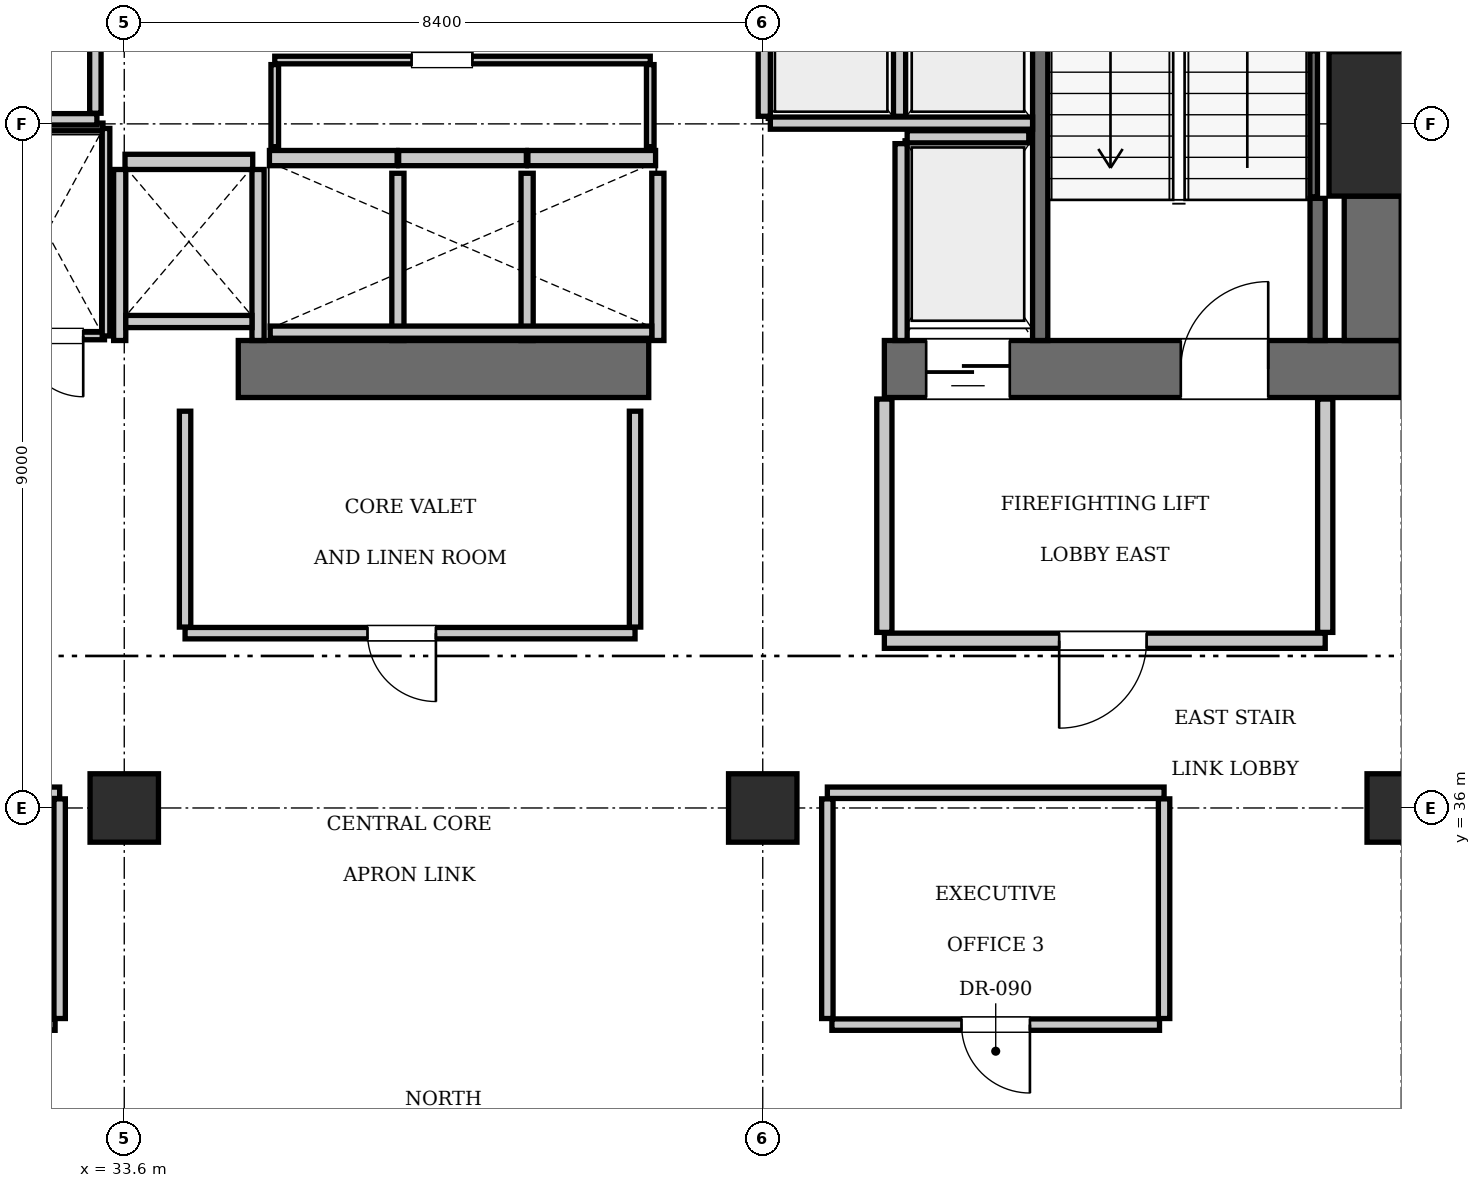
"""IFC4 building model, lengths in metres.
Left out: names, types, materials, properties, quantities, classifications, styles, units other than length and angle.
Written with IfcOpenShell. Run it as: python <this file> out.ifc"""

import sys

from ifc_helpers import new_model, si_unit, direction, frame, frame_2d, origin, origin_2d, place, context, subcontext, project, spatial, rectangle, extrude, element, fill, save


model = new_model("IFC4")
c1 = context("Model", 3, precision=1e-05, world=origin(), true_north=direction((0.0, 1.0)))
c2 = subcontext(c1, "Body", "Model", "MODEL_VIEW")
j1 = project(units=[si_unit("LENGTHUNIT", "METRE"), si_unit("PLANEANGLEUNIT", "RADIAN")], contexts=[c1])
p1 = place(None, origin())
s1 = spatial("IfcSite", under=j1, at=p1, CompositionType="ELEMENT")
p2 = place(p1, origin())
s2 = spatial("IfcBuilding", under=s1, at=p2, CompositionType="ELEMENT")
p3 = place(p2, frame((0.0, 0.0, 196.7)))
s3 = spatial("IfcBuildingStorey", under=s2, at=p3, CompositionType="ELEMENT", Elevation=196.7)
p4 = place(p3, frame((50.4, 45.0, 0.0), z_axis=(0.0, 0.0, 1.0), x_axis=(1.0, 0.0, 0.0)))
e1 = element("IfcColumn", 1, at=p4, inside=s3, PredefinedType="COLUMN", context=c2, shape_type="SweptSolid", body=[
    extrude(rectangle(XDim=1.9, YDim=1.9, at=origin_2d()), origin(), (0.0, 0.0, 1.0), 3.85),
])
p5 = place(p3, frame((35.1, 41.775, 0.0), z_axis=(0.0, 0.0, 1.0), x_axis=(1.0, 0.0, 0.0)))
e2 = element("IfcWall", 2, at=p5, inside=s3, PredefinedType="SHEAR", context=c2, shape_type="SweptSolid", body=[
    extrude(rectangle(XDim=5.4, YDim=0.75, at=frame_2d((2.7, 0.0))), origin(), (0.0, 0.0, 1.0), 3.85),
])
p6 = place(p3, frame((43.6, 41.775, 0.0), z_axis=(0.0, 0.0, 1.0), x_axis=(1.0, 0.0, 0.0)))
e3 = element("IfcWall", 3, at=p6, inside=s3, PredefinedType="SHEAR", context=c2, shape_type="SweptSolid", body=[
    extrude(rectangle(XDim=6.8, YDim=0.75, at=frame_2d((3.4, 0.0))), origin(), (0.0, 0.0, 1.0), 3.85),
])
p7 = place(p6, frame((3.9, 0.0, 0.0)))
e4 = element("IfcOpeningElement", 4, at=p7, cuts=e3, PredefinedType="OPENING", context=c2, shape_type="SweptSolid", body=[
    extrude(rectangle(XDim=1.15, YDim=2.15, at=frame_2d((0.575, 1.075))), frame((0.0, 0.385, 0.0), z_axis=(0.0, -1.0, 0.0), x_axis=(1.0, 0.0, 0.0)), (0.0, 0.0, 1.0), 0.77),
])
p8 = place(p6, frame((0.55, 0.0, 0.0)))
e5 = element("IfcOpeningElement", 5, at=p8, cuts=e3, PredefinedType="OPENING", context=c2, shape_type="SweptSolid", body=[
    extrude(rectangle(XDim=1.1, YDim=2.2, at=frame_2d((0.55, 1.1))), frame((0.0, 0.385, 0.0), z_axis=(0.0, -1.0, 0.0), x_axis=(1.0, 0.0, 0.0)), (0.0, 0.0, 1.0), 0.77),
])
p9 = place(p3, frame((50.025, 42.15, 0.0), z_axis=(0.0, 0.0, 1.0), x_axis=(0.0, 1.0, 0.0)))
e6 = element("IfcWall", 6, at=p9, inside=s3, PredefinedType="SHEAR", context=c2, shape_type="SweptSolid", body=[
    extrude(rectangle(XDim=1.9, YDim=0.75, at=frame_2d((0.95, 0.0))), origin(), (0.0, 0.0, 1.0), 3.85),
])
p10 = place(p3, frame((50.025, 45.95, 0.0), z_axis=(0.0, 0.0, 1.0), x_axis=(0.0, 1.0, 0.0)))
e7 = element("IfcWall", 7, at=p10, inside=s3, PredefinedType="SHEAR", context=c2, shape_type="SweptSolid", body=[
    extrude(rectangle(XDim=7.3, YDim=0.75, at=frame_2d((3.65, 0.0))), origin(), (0.0, 0.0, 1.0), 3.85),
])
for number, where, z_axis, x_axis in (
    (8, (33.6, 36.0, 0.0), (0.0, 0.0, 1.0), (1.0, 0.0, 0.0)),
    (9, (42.0, 36.0, 0.0), (0.0, 0.0, 1.0), (1.0, 0.0, 0.0)),
    (10, (50.4, 36.0, 0.0), (0.0, 0.0, 1.0), (1.0, 0.0, 0.0)),
):
    element("IfcColumn", number, at=place(p3, frame(where, z_axis=z_axis, x_axis=x_axis)), inside=s3, PredefinedType="COLUMN", context=c2, shape_type="SweptSolid", body=[
        extrude(rectangle(XDim=0.9, YDim=0.9, at=origin_2d()), origin(), (0.0, 0.0, 1.0), 3.85),
    ])
p11 = place(p3, frame((45.65, 42.15, 0.0), z_axis=(0.0, 0.0, 1.0), x_axis=(0.0, 1.0, 0.0)))
e11 = element("IfcWall", 11, at=p11, inside=s3, PredefinedType="SOLIDWALL", context=c2, shape_type="SweptSolid", body=[
    extrude(rectangle(XDim=9.0, YDim=0.2, at=frame_2d((4.5, 0.0))), origin(), (0.0, 0.0, 1.0), 3.61),
])
p12 = place(p3, frame((49.3, 42.15, 0.0), z_axis=(0.0, 0.0, 1.0), x_axis=(0.0, 1.0, 0.0)))
e12 = element("IfcWall", 12, at=p12, inside=s3, PredefinedType="SOLIDWALL", context=c2, shape_type="SweptSolid", body=[
    extrude(rectangle(XDim=1.87, YDim=0.2, at=frame_2d((0.935, 0.0))), origin(), (0.0, 0.0, 1.0), 3.61),
])
p13 = place(p3, frame((49.248, 44.04, 0.0), z_axis=(0.0, 0.0, 1.0), x_axis=(0.0, 1.0, 0.0)))
e13 = element("IfcWall", 13, at=p13, inside=s3, PredefinedType="SOLIDWALL", context=c2, shape_type="SweptSolid", body=[
    extrude(rectangle(XDim=1.92, YDim=0.1, at=frame_2d((0.96, 0.0))), origin(), (0.0, 0.0, 1.0), 3.61),
])
for number, where, z_axis, x_axis in (
    (14, (35.51, 44.55, 0.0), (0.0, 0.0, 1.0), (1.0, 0.0, 0.0)),
    (15, (37.21, 44.55, 0.0), (0.0, 0.0, 1.0), (1.0, 0.0, 0.0)),
):
    element("IfcWall", number, at=place(p3, frame(where, z_axis=z_axis, x_axis=x_axis)), inside=s3, PredefinedType="SOLIDWALL", context=c2, shape_type="SweptSolid", body=[
        extrude(rectangle(XDim=1.68, YDim=0.2, at=frame_2d((0.84, 0.0))), origin(), (0.0, 0.0, 1.0), 3.61),
    ])
p14 = place(p3, frame((38.91, 44.55, 0.0), z_axis=(0.0, 0.0, 1.0), x_axis=(1.0, 0.0, 0.0)))
e16 = element("IfcWall", 16, at=p14, inside=s3, PredefinedType="SOLIDWALL", context=c2, shape_type="SweptSolid", body=[
    extrude(rectangle(XDim=1.68, YDim=0.2, at=frame_2d((0.84, 0.0))), origin(), (0.0, 0.0, 1.0), 3.61),
])
p15 = place(p3, frame((33.61, 44.5, 0.0), z_axis=(0.0, 0.0, 1.0), x_axis=(1.0, 0.0, 0.0)))
e17 = element("IfcWall", 17, at=p15, inside=s3, PredefinedType="SOLIDWALL", context=c2, shape_type="SweptSolid", body=[
    extrude(rectangle(XDim=1.68, YDim=0.2, at=frame_2d((0.84, 0.0))), origin(), (0.0, 0.0, 1.0), 3.61),
])
p16 = place(p3, frame((43.9, 44.83, 0.0), z_axis=(0.0, 0.0, 1.0), x_axis=(1.0, 0.0, 0.0)))
e18 = element("IfcWall", 18, at=p16, inside=s3, PredefinedType="SOLIDWALL", context=c2, shape_type="SweptSolid", body=[
    extrude(rectangle(XDim=1.6, YDim=0.16, at=frame_2d((0.8, 0.0))), origin(), (0.0, 0.0, 1.0), 3.61),
])
p17 = place(p3, frame((43.82, 42.15, 0.0), z_axis=(0.0, 0.0, 1.0), x_axis=(0.0, 1.0, 0.0)))
e19 = element("IfcWall", 19, at=p17, inside=s3, PredefinedType="SOLIDWALL", context=c2, shape_type="SweptSolid", body=[
    extrude(rectangle(XDim=2.59, YDim=0.16, at=frame_2d((1.295, 0.0))), origin(), (0.0, 0.0, 1.0), 3.61),
])
for number, where, z_axis, x_axis in (
    (20, (42.02, 45.1, 0.0), (0.0, 0.0, 1.0), (0.0, 1.0, 0.0)),
    (21, (43.8, 45.1, 0.0), (0.0, 0.0, 1.0), (0.0, 1.0, 0.0)),
):
    element("IfcWall", number, at=place(p3, frame(where, z_axis=z_axis, x_axis=x_axis)), inside=s3, PredefinedType="SOLIDWALL", context=c2, shape_type="SweptSolid", body=[
        extrude(rectangle(XDim=1.95, YDim=0.16, at=frame_2d((0.975, 0.0))), origin(), (0.0, 0.0, 1.0), 3.61),
    ])
p18 = place(p3, frame((42.1, 45.01, 0.0), z_axis=(0.0, 0.0, 1.0), x_axis=(1.0, 0.0, 0.0)))
e22 = element("IfcWall", 22, at=p18, inside=s3, PredefinedType="SOLIDWALL", context=c2, shape_type="SweptSolid", body=[
    extrude(rectangle(XDim=3.45, YDim=0.16, at=frame_2d((1.725, 0.0))), origin(), (0.0, 0.0, 1.0), 3.61),
])
for number, where, z_axis, x_axis in (
    (23, (37.2, 42.15, 0.0), (0.0, 0.0, 1.0), (0.0, 1.0, 0.0)),
    (24, (38.9, 42.15, 0.0), (0.0, 0.0, 1.0), (0.0, 1.0, 0.0)),
    (25, (40.62, 42.15, 0.0), (0.0, 0.0, 1.0), (0.0, 1.0, 0.0)),
):
    element("IfcWall", number, at=place(p3, frame(where, z_axis=z_axis, x_axis=x_axis)), inside=s3, PredefinedType="SOLIDWALL", context=c2, shape_type="SweptSolid", body=[
        extrude(rectangle(XDim=2.2, YDim=0.16, at=frame_2d((1.1, 0.0))), origin(), (0.0, 0.0, 1.0), 3.61),
    ])
p19 = place(p3, frame((35.52, 42.26, 0.0), z_axis=(0.0, 0.0, 1.0), x_axis=(1.0, 0.0, 0.0)))
e26 = element("IfcWall", 26, at=p19, inside=s3, PredefinedType="SOLIDWALL", context=c2, shape_type="SweptSolid", body=[
    extrude(rectangle(XDim=5.02, YDim=0.16, at=frame_2d((2.51, 0.0))), origin(), (0.0, 0.0, 1.0), 3.61),
])
for number, where, z_axis, x_axis in (
    (27, (33.54, 42.15, 0.0), (0.0, 0.0, 1.0), (0.0, 1.0, 0.0)),
    (28, (35.36, 42.15, 0.0), (0.0, 0.0, 1.0), (0.0, 1.0, 0.0)),
):
    element("IfcWall", number, at=place(p3, frame(where, z_axis=z_axis, x_axis=x_axis)), inside=s3, PredefinedType="SOLIDWALL", context=c2, shape_type="SweptSolid", body=[
        extrude(rectangle(XDim=2.25, YDim=0.16, at=frame_2d((1.125, 0.0))), origin(), (0.0, 0.0, 1.0), 3.61),
    ])
p20 = place(p3, frame((33.62, 42.4, 0.0), z_axis=(0.0, 0.0, 1.0), x_axis=(1.0, 0.0, 0.0)))
e29 = element("IfcWall", 29, at=p20, inside=s3, PredefinedType="SOLIDWALL", context=c2, shape_type="SweptSolid", body=[
    extrude(rectangle(XDim=1.66, YDim=0.16, at=frame_2d((0.83, 0.0))), origin(), (0.0, 0.0, 1.0), 3.61),
])
p21 = place(p3, frame((43.6, 38.2, 0.0), z_axis=(0.0, 0.0, 1.0), x_axis=(1.0, 0.0, 0.0)))
e30 = element("IfcWall", 30, at=p21, inside=s3, PredefinedType="PARTITIONING", context=c2, shape_type="SweptSolid", body=[
    extrude(rectangle(XDim=5.8, YDim=0.2, at=frame_2d((2.9, 0.0))), origin(), (0.0, 0.0, 1.0), 3.61),
])
p22 = place(p21, frame((2.3, 0.0, 0.0)))
e31 = element("IfcOpeningElement", 31, at=p22, cuts=e30, PredefinedType="OPENING", context=c2, shape_type="SweptSolid", body=[
    extrude(rectangle(XDim=1.15, YDim=2.15, at=frame_2d((0.575, 1.075))), frame((0.0, 0.11, 0.0), z_axis=(0.0, -1.0, 0.0), x_axis=(1.0, 0.0, 0.0)), (0.0, 0.0, 1.0), 0.22),
])
for number, where, z_axis, x_axis in (
    (32, (43.6, 38.31, 0.0), (0.0, 0.0, 1.0), (0.0, 1.0, 0.0)),
    (33, (49.4, 38.31, 0.0), (0.0, 0.0, 1.0), (0.0, 1.0, 0.0)),
):
    element("IfcWall", number, at=place(p3, frame(where, z_axis=z_axis, x_axis=x_axis)), inside=s3, PredefinedType="PARTITIONING", context=c2, shape_type="SweptSolid", body=[
        extrude(rectangle(XDim=3.07, YDim=0.2, at=frame_2d((1.535, 0.0))), origin(), (0.0, 0.0, 1.0), 3.61),
    ])
p23 = place(p3, frame((32.02, 42.21, 0.0), z_axis=(0.0, 0.0, 1.0), x_axis=(1.0, 0.0, 0.0)))
e34 = element("IfcWall", 34, at=p23, inside=s3, PredefinedType="PARTITIONING", context=c2, shape_type="SweptSolid", body=[
    extrude(rectangle(XDim=1.32, YDim=0.1, at=frame_2d((0.66, 0.0))), origin(), (0.0, 0.0, 1.0), 3.61),
])
p24 = place(p23, frame((0.24, 0.0, 0.0)))
e35 = element("IfcOpeningElement", 35, at=p24, cuts=e34, PredefinedType="OPENING", context=c2, shape_type="SweptSolid", body=[
    extrude(rectangle(XDim=0.8, YDim=2.05, at=frame_2d((0.4, 1.025))), frame((0.0, 0.06, 0.0), z_axis=(0.0, -1.0, 0.0), x_axis=(1.0, 0.0, 0.0)), (0.0, 0.0, 1.0), 0.12),
])
p25 = place(p3, frame((31.84, 44.96, 0.0), z_axis=(0.0, 0.0, 1.0), x_axis=(1.0, 0.0, 0.0)))
e36 = element("IfcWall", 36, at=p25, inside=s3, PredefinedType="PARTITIONING", context=c2, shape_type="SweptSolid", body=[
    extrude(rectangle(XDim=1.48, YDim=0.1, at=frame_2d((0.74, 0.0))), origin(), (0.0, 0.0, 1.0), 3.61),
])
p26 = place(p3, frame((33.36, 42.21, 0.0), z_axis=(0.0, 0.0, 1.0), x_axis=(0.0, 1.0, 0.0)))
e37 = element("IfcWall", 37, at=p26, inside=s3, PredefinedType="PARTITIONING", context=c2, shape_type="SweptSolid", body=[
    extrude(rectangle(XDim=2.73, YDim=0.1, at=frame_2d((1.365, 0.0))), origin(), (0.0, 0.0, 1.0), 3.61),
])
p27 = place(p3, frame((35.58, 45.84, 0.0), z_axis=(0.0, 0.0, 1.0), x_axis=(1.0, 0.0, 0.0)))
e38 = element("IfcWall", 38, at=p27, inside=s3, PredefinedType="PARTITIONING", context=c2, shape_type="SweptSolid", body=[
    extrude(rectangle(XDim=4.94, YDim=0.1, at=frame_2d((2.47, 0.0))), origin(), (0.0, 0.0, 1.0), 3.61),
])
p28 = place(p27, frame((1.8, 0.0, 0.0)))
e39 = element("IfcOpeningElement", 39, at=p28, cuts=e38, PredefinedType="OPENING", context=c2, shape_type="SweptSolid", body=[
    extrude(rectangle(XDim=0.8, YDim=2.05, at=frame_2d((0.4, 1.025))), frame((0.0, 0.06, 0.0), z_axis=(0.0, -1.0, 0.0), x_axis=(1.0, 0.0, 0.0)), (0.0, 0.0, 1.0), 0.12),
])
for number, where, z_axis, x_axis in (
    (40, (35.58, 44.7, 0.0), (0.0, 0.0, 1.0), (0.0, 1.0, 0.0)),
    (41, (40.52, 44.7, 0.0), (0.0, 0.0, 1.0), (0.0, 1.0, 0.0)),
):
    element("IfcWall", number, at=place(p3, frame(where, z_axis=z_axis, x_axis=x_axis)), inside=s3, PredefinedType="PARTITIONING", context=c2, shape_type="SweptSolid", body=[
        extrude(rectangle(XDim=1.08, YDim=0.1, at=frame_2d((0.54, 0.0))), origin(), (0.0, 0.0, 1.0), 3.61),
    ])
p29 = place(p3, frame((30.06, 45.06, 0.0), z_axis=(0.0, 0.0, 1.0), x_axis=(1.0, 0.0, 0.0)))
e42 = element("IfcWall", 42, at=p29, inside=s3, PredefinedType="PARTITIONING", context=c2, shape_type="SweptSolid", body=[
    extrude(rectangle(XDim=3.18, YDim=0.15, at=frame_2d((1.59, 0.0))), origin(), (0.0, 0.0, 1.0), 3.61),
])
p30 = place(p3, frame((33.22, 45.14, 0.0), z_axis=(0.0, 0.0, 1.0), x_axis=(0.0, 1.0, 0.0)))
e43 = element("IfcWall", 43, at=p30, inside=s3, PredefinedType="PARTITIONING", context=c2, shape_type="SweptSolid", body=[
    extrude(rectangle(XDim=4.16, YDim=0.15, at=frame_2d((2.08, 0.0))), origin(), (0.0, 0.0, 1.0), 3.61),
])
p31 = place(p3, frame((34.4, 38.3, 0.0), z_axis=(0.0, 0.0, 1.0), x_axis=(1.0, 0.0, 0.0)))
e44 = element("IfcWall", 44, at=p31, inside=s3, PredefinedType="PARTITIONING", context=c2, shape_type="SweptSolid", body=[
    extrude(rectangle(XDim=5.92, YDim=0.15, at=frame_2d((2.96, 0.0))), origin(), (0.0, 0.0, 1.0), 3.61),
])
p32 = place(p31, frame((2.4, 0.0, 0.0)))
e45 = element("IfcOpeningElement", 45, at=p32, cuts=e44, PredefinedType="OPENING", context=c2, shape_type="SweptSolid", body=[
    extrude(rectangle(XDim=0.9, YDim=2.1, at=frame_2d((0.45, 1.05))), frame((0.0, 0.085, 0.0), z_axis=(0.0, -1.0, 0.0), x_axis=(1.0, 0.0, 0.0)), (0.0, 0.0, 1.0), 0.17),
])
for number, where, z_axis, x_axis in (
    (46, (34.4, 38.38, 0.0), (0.0, 0.0, 1.0), (0.0, 1.0, 0.0)),
    (47, (40.32, 38.38, 0.0), (0.0, 0.0, 1.0), (0.0, 1.0, 0.0)),
):
    element("IfcWall", number, at=place(p3, frame(where, z_axis=z_axis, x_axis=x_axis)), inside=s3, PredefinedType="PARTITIONING", context=c2, shape_type="SweptSolid", body=[
        extrude(rectangle(XDim=2.84, YDim=0.15, at=frame_2d((1.42, 0.0))), origin(), (0.0, 0.0, 1.0), 3.61),
    ])
p33 = place(p3, frame((28.32, 36.2, 0.0), z_axis=(0.0, 0.0, 1.0), x_axis=(1.0, 0.0, 0.0)))
e48 = element("IfcWall", 48, at=p33, inside=s3, PredefinedType="PARTITIONING", context=c2, shape_type="SweptSolid", body=[
    extrude(rectangle(XDim=4.43, YDim=0.15, at=frame_2d((2.215, 0.0))), origin(), (0.0, 0.0, 1.0), 3.61),
])
p34 = place(p3, frame((32.75, 33.23, 0.0), z_axis=(0.0, 0.0, 1.0), x_axis=(0.0, 1.0, 0.0)))
e49 = element("IfcWall", 49, at=p34, inside=s3, PredefinedType="PARTITIONING", context=c2, shape_type="SweptSolid", body=[
    extrude(rectangle(XDim=2.89, YDim=0.15, at=frame_2d((1.445, 0.0))), origin(), (0.0, 0.0, 1.0), 3.61),
])
p35 = place(p3, frame((28.38, 33.15, 0.0), z_axis=(0.0, 0.0, 1.0), x_axis=(1.0, 0.0, 0.0)))
e50 = element("IfcWall", 50, at=p35, inside=s3, PredefinedType="PARTITIONING", context=c2, shape_type="SweptSolid", body=[
    extrude(rectangle(XDim=4.31, YDim=0.15, at=frame_2d((2.155, 0.0))), origin(), (0.0, 0.0, 1.0), 3.61),
])
p36 = place(p35, frame((1.705, 0.0, 0.0)))
e51 = element("IfcOpeningElement", 51, at=p36, cuts=e50, PredefinedType="OPENING", context=c2, shape_type="SweptSolid", body=[
    extrude(rectangle(XDim=0.9, YDim=2.1, at=frame_2d((0.45, 1.05))), frame((0.0, 0.085, 0.0), z_axis=(0.0, -1.0, 0.0), x_axis=(1.0, 0.0, 0.0)), (0.0, 0.0, 1.0), 0.17),
])
p37 = place(p3, frame((42.85, 36.2, 0.0), z_axis=(0.0, 0.0, 1.0), x_axis=(1.0, 0.0, 0.0)))
e52 = element("IfcWall", 52, at=p37, inside=s3, PredefinedType="PARTITIONING", context=c2, shape_type="SweptSolid", body=[
    extrude(rectangle(XDim=4.43, YDim=0.15, at=frame_2d((2.215, 0.0))), origin(), (0.0, 0.0, 1.0), 3.61),
])
for number, where, z_axis, x_axis in (
    (53, (42.85, 33.23, 0.0), (0.0, 0.0, 1.0), (0.0, 1.0, 0.0)),
    (54, (47.28, 33.23, 0.0), (0.0, 0.0, 1.0), (0.0, 1.0, 0.0)),
):
    element("IfcWall", number, at=place(p3, frame(where, z_axis=z_axis, x_axis=x_axis)), inside=s3, PredefinedType="PARTITIONING", context=c2, shape_type="SweptSolid", body=[
        extrude(rectangle(XDim=2.89, YDim=0.15, at=frame_2d((1.445, 0.0))), origin(), (0.0, 0.0, 1.0), 3.61),
    ])
p38 = place(p3, frame((42.91, 33.15, 0.0), z_axis=(0.0, 0.0, 1.0), x_axis=(1.0, 0.0, 0.0)))
e55 = element("IfcWall", 55, at=p38, inside=s3, PredefinedType="PARTITIONING", context=c2, shape_type="SweptSolid", body=[
    extrude(rectangle(XDim=4.31, YDim=0.15, at=frame_2d((2.155, 0.0))), origin(), (0.0, 0.0, 1.0), 3.61),
])
p39 = place(p38, frame((1.705, 0.0, 0.0)))
e56 = element("IfcOpeningElement", 56, at=p39, cuts=e55, PredefinedType="OPENING", context=c2, shape_type="SweptSolid", body=[
    extrude(rectangle(XDim=0.9, YDim=2.1, at=frame_2d((0.45, 1.05))), frame((0.0, 0.085, 0.0), z_axis=(0.0, -1.0, 0.0), x_axis=(1.0, 0.0, 0.0)), (0.0, 0.0, 1.0), 0.17),
])
p40 = place(p7, origin())
e57 = element("IfcDoor", 57, at=p40, inside=s3, OperationType="SINGLE_SWING_RIGHT", PredefinedType="DOOR", context=c2, shape_type="SweptSolid", body=[
    extrude(rectangle(XDim=1.15, YDim=2.15, at=frame_2d((0.575, 1.075))), frame((0.0, 0.025, 0.0), z_axis=(0.0, -1.0, 0.0), x_axis=(1.0, 0.0, 0.0)), (0.0, 0.0, 1.0), 0.05),
])
fill(e4, e57)
p41 = place(p8, frame((1.1, 0.0, 0.0), z_axis=(0.0, 0.0, 1.0), x_axis=(-1.0, 0.0, 0.0)))
e58 = element("IfcDoor", 58, at=p41, inside=s3, OperationType="SLIDING_TO_LEFT", PredefinedType="DOOR", context=c2, shape_type="SweptSolid", body=[
    extrude(rectangle(XDim=1.1, YDim=2.2, at=frame_2d((0.55, 1.1))), frame((0.0, 0.025, 0.0), z_axis=(0.0, -1.0, 0.0), x_axis=(1.0, 0.0, 0.0)), (0.0, 0.0, 1.0), 0.05),
])
fill(e5, e58)
p42 = place(p22, frame((1.15, 0.0, 0.0), z_axis=(0.0, 0.0, 1.0), x_axis=(-1.0, 0.0, 0.0)))
e59 = element("IfcDoor", 59, at=p42, inside=s3, OperationType="SINGLE_SWING_RIGHT", PredefinedType="DOOR", context=c2, shape_type="SweptSolid", body=[
    extrude(rectangle(XDim=1.15, YDim=2.15, at=frame_2d((0.575, 1.075))), frame((0.0, 0.025, 0.0), z_axis=(0.0, -1.0, 0.0), x_axis=(1.0, 0.0, 0.0)), (0.0, 0.0, 1.0), 0.05),
])
fill(e31, e59)
p43 = place(p24, frame((0.8, 0.0, 0.0), z_axis=(0.0, 0.0, 1.0), x_axis=(-1.0, 0.0, 0.0)))
e60 = element("IfcDoor", 60, at=p43, inside=s3, OperationType="SINGLE_SWING_LEFT", PredefinedType="DOOR", context=c2, shape_type="SweptSolid", body=[
    extrude(rectangle(XDim=0.8, YDim=2.05, at=frame_2d((0.4, 1.025))), frame((0.0, 0.025, 0.0), z_axis=(0.0, -1.0, 0.0), x_axis=(1.0, 0.0, 0.0)), (0.0, 0.0, 1.0), 0.05),
])
fill(e35, e60)
p44 = place(p28, origin())
e61 = element("IfcDoor", 61, at=p44, inside=s3, OperationType="SINGLE_SWING_RIGHT", PredefinedType="DOOR", context=c2, shape_type="SweptSolid", body=[
    extrude(rectangle(XDim=0.8, YDim=2.05, at=frame_2d((0.4, 1.025))), frame((0.0, 0.025, 0.0), z_axis=(0.0, -1.0, 0.0), x_axis=(1.0, 0.0, 0.0)), (0.0, 0.0, 1.0), 0.05),
])
fill(e39, e61)
p45 = place(p32, frame((0.9, 0.0, 0.0), z_axis=(0.0, 0.0, 1.0), x_axis=(-1.0, 0.0, 0.0)))
e62 = element("IfcDoor", 62, at=p45, inside=s3, OperationType="SINGLE_SWING_LEFT", PredefinedType="DOOR", context=c2, shape_type="SweptSolid", body=[
    extrude(rectangle(XDim=0.9, YDim=2.1, at=frame_2d((0.45, 1.05))), frame((0.0, 0.025, 0.0), z_axis=(0.0, -1.0, 0.0), x_axis=(1.0, 0.0, 0.0)), (0.0, 0.0, 1.0), 0.05),
])
fill(e45, e62)
p46 = place(p39, frame((0.9, 0.0, 0.0), z_axis=(0.0, 0.0, 1.0), x_axis=(-1.0, 0.0, 0.0)))
e63 = element("IfcDoor", 63, at=p46, inside=s3, OperationType="SINGLE_SWING_LEFT", PredefinedType="DOOR", context=c2, shape_type="SweptSolid", body=[
    extrude(rectangle(XDim=0.9, YDim=2.1, at=frame_2d((0.45, 1.05))), frame((0.0, 0.025, 0.0), z_axis=(0.0, -1.0, 0.0), x_axis=(1.0, 0.0, 0.0)), (0.0, 0.0, 1.0), 0.05),
])
fill(e56, e63)
save(model, sys.argv[1])
